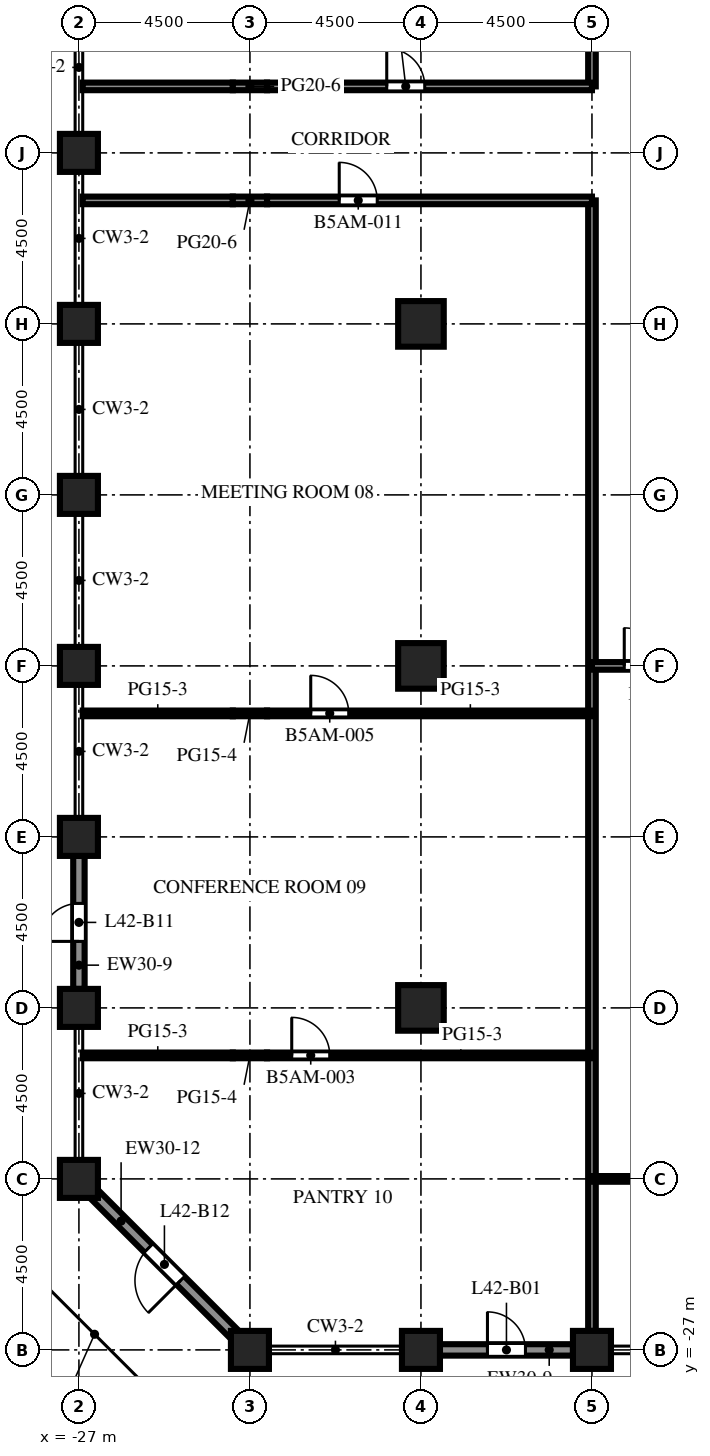
"""IFC4 building model, lengths in metres.
Left out: names, types, materials, properties, quantities, classifications, styles, units other than length and angle.
Written with IfcOpenShell. Run it as: python <this file> out.ifc"""

import sys

from ifc_helpers import new_model, si_unit, direction, frame, frame_2d, origin, origin_2d, place, context, subcontext, project, spatial, rectangle, extrude, element, fill, save


model = new_model("IFC4")
c1 = context("Model", 3, precision=1e-05, world=origin(), true_north=direction((0.0, 1.0)))
c2 = subcontext(c1, "Body", "Model", "MODEL_VIEW")
j1 = project(units=[si_unit("LENGTHUNIT", "METRE"), si_unit("PLANEANGLEUNIT", "RADIAN")], contexts=[c1])
p1 = place(None, origin())
s1 = spatial("IfcSite", under=j1, at=p1, CompositionType="ELEMENT")
p2 = place(p1, origin())
s2 = spatial("IfcBuilding", under=s1, at=p2, CompositionType="ELEMENT")
p3 = place(p2, frame((0.0, 0.0, 185.5)))
s3 = spatial("IfcBuildingStorey", under=s2, at=p3, CompositionType="ELEMENT", Elevation=185.5)
p4 = place(p3, frame((-27.0, -22.5, 0.0), z_axis=(0.0, 0.0, 1.0), x_axis=(1.0, 0.0, 0.0)))
e1 = element("IfcColumn", 1, at=p4, inside=s3, PredefinedType="COLUMN", context=c2, shape_type="SweptSolid", body=[
    extrude(rectangle(XDim=1.0, YDim=1.0, at=origin_2d()), origin(), (0.0, 0.0, 1.0), 6.0),
])
p5 = place(p3, frame((-27.0, -18.0, 0.0), z_axis=(0.0, 0.0, 1.0), x_axis=(1.0, 0.0, 0.0)))
e2 = element("IfcColumn", 2, at=p5, inside=s3, PredefinedType="COLUMN", context=c2, shape_type="SweptSolid", body=[
    extrude(rectangle(XDim=1.0, YDim=1.0, at=origin_2d()), origin(), (0.0, 0.0, 1.0), 3.75),
])
p6 = place(p3, frame((-27.0, -13.5, 0.0), z_axis=(0.0, 0.0, 1.0), x_axis=(1.0, 0.0, 0.0)))
e3 = element("IfcColumn", 3, at=p6, inside=s3, PredefinedType="COLUMN", context=c2, shape_type="SweptSolid", body=[
    extrude(rectangle(XDim=1.0, YDim=1.0, at=origin_2d()), origin(), (0.0, 0.0, 1.0), 6.0),
])
p7 = place(p3, frame((-27.0, -9.0, 0.0), z_axis=(0.0, 0.0, 1.0), x_axis=(1.0, 0.0, 0.0)))
e4 = element("IfcColumn", 4, at=p7, inside=s3, PredefinedType="COLUMN", context=c2, shape_type="SweptSolid", body=[
    extrude(rectangle(XDim=1.0, YDim=1.0, at=origin_2d()), origin(), (0.0, 0.0, 1.0), 3.75),
])
p8 = place(p3, frame((-27.0, -4.5, 0.0), z_axis=(0.0, 0.0, 1.0), x_axis=(1.0, 0.0, 0.0)))
e5 = element("IfcColumn", 5, at=p8, inside=s3, PredefinedType="COLUMN", context=c2, shape_type="SweptSolid", body=[
    extrude(rectangle(XDim=1.0, YDim=1.0, at=origin_2d()), origin(), (0.0, 0.0, 1.0), 6.0),
])
p9 = place(p3, frame((-27.0, 0.0, 0.0), z_axis=(0.0, 0.0, 1.0), x_axis=(1.0, 0.0, 0.0)))
e6 = element("IfcColumn", 6, at=p9, inside=s3, PredefinedType="COLUMN", context=c2, shape_type="SweptSolid", body=[
    extrude(rectangle(XDim=1.0, YDim=1.0, at=origin_2d()), origin(), (0.0, 0.0, 1.0), 3.75),
])
p10 = place(p3, frame((-27.0, 4.5, 0.0), z_axis=(0.0, 0.0, 1.0), x_axis=(1.0, 0.0, 0.0)))
e7 = element("IfcColumn", 7, at=p10, inside=s3, PredefinedType="COLUMN", context=c2, shape_type="SweptSolid", body=[
    extrude(rectangle(XDim=1.0, YDim=1.0, at=origin_2d()), origin(), (0.0, 0.0, 1.0), 6.0),
])
p11 = place(p3, frame((-22.5, -27.0, 0.0), z_axis=(0.0, 0.0, 1.0), x_axis=(1.0, 0.0, 0.0)))
e8 = element("IfcColumn", 8, at=p11, inside=s3, PredefinedType="COLUMN", context=c2, shape_type="SweptSolid", body=[
    extrude(rectangle(XDim=1.0, YDim=1.0, at=origin_2d()), origin(), (0.0, 0.0, 1.0), 3.75),
])
for number, where, z_axis, x_axis in (
    (9, (-18.0, -27.0, 0.0), (0.0, 0.0, 1.0), (1.0, 0.0, 0.0)),
    (10, (-13.5, -27.0, 0.0), (0.0, 0.0, 1.0), (1.0, 0.0, 0.0)),
):
    element("IfcColumn", number, at=place(p3, frame(where, z_axis=z_axis, x_axis=x_axis)), inside=s3, PredefinedType="COLUMN", context=c2, shape_type="SweptSolid", body=[
        extrude(rectangle(XDim=1.0, YDim=1.0, at=origin_2d()), origin(), (0.0, 0.0, 1.0), 6.0),
    ])
for number, where, z_axis, x_axis in (
    (11, (-18.0, -18.0, 0.0), (0.0, 0.0, 1.0), (1.0, 0.0, 0.0)),
    (12, (-18.0, -9.0, 0.0), (0.0, 0.0, 1.0), (1.0, 0.0, 0.0)),
    (13, (-18.0, 0.0, 0.0), (0.0, 0.0, 1.0), (1.0, 0.0, 0.0)),
):
    element("IfcColumn", number, at=place(p3, frame(where, z_axis=z_axis, x_axis=x_axis)), inside=s3, PredefinedType="COLUMN", context=c2, shape_type="SweptSolid", body=[
        extrude(rectangle(XDim=1.2, YDim=1.2, at=origin_2d()), origin(), (0.0, 0.0, 1.0), 5.55),
    ])
p12 = place(p3, frame((-14.0, -27.0, 0.0), z_axis=(0.0, 0.0, 1.0), x_axis=(-1.0, 0.0, 0.0)))
e14 = element("IfcWall", 14, at=p12, inside=s3, PredefinedType="SOLIDWALL", context=c2, shape_type="SweptSolid", body=[
    extrude(rectangle(XDim=3.5, YDim=0.3, at=frame_2d((1.75, 0.0))), origin(), (0.0, 0.0, 1.0), 4.75),
])
p13 = place(p12, frame((1.25, 0.0, 0.0)))
e15 = element("IfcOpeningElement", 15, at=p13, cuts=e14, PredefinedType="OPENING", context=c2, shape_type="SweptSolid", body=[
    extrude(rectangle(XDim=1.0, YDim=2.2, at=frame_2d((0.5, 1.1))), frame((0.0, 0.16, 0.0), z_axis=(0.0, -1.0, 0.0), x_axis=(1.0, 0.0, 0.0)), (0.0, 0.0, 1.0), 0.32),
])
p14 = place(p3, frame((-27.0, -17.5, 0.0), z_axis=(0.0, 0.0, 1.0), x_axis=(0.0, 1.0, 0.0)))
e16 = element("IfcWall", 16, at=p14, inside=s3, PredefinedType="SOLIDWALL", context=c2, shape_type="SweptSolid", body=[
    extrude(rectangle(XDim=3.5, YDim=0.3, at=frame_2d((1.75, 0.0))), origin(), (0.0, 0.0, 1.0), 4.75),
])
p15 = place(p14, frame((1.25, 0.0, 0.0)))
e17 = element("IfcOpeningElement", 17, at=p15, cuts=e16, PredefinedType="OPENING", context=c2, shape_type="SweptSolid", body=[
    extrude(rectangle(XDim=1.0, YDim=2.2, at=frame_2d((0.5, 1.1))), frame((0.0, 0.16, 0.0), z_axis=(0.0, -1.0, 0.0), x_axis=(1.0, 0.0, 0.0)), (0.0, 0.0, 1.0), 0.32),
])
p16 = place(p3, frame((-22.894, -26.606, 0.0), z_axis=(0.0, 0.0, 1.0), x_axis=(-0.707106781187, 0.707106781187, 0.0)))
e18 = element("IfcWall", 18, at=p16, inside=s3, PredefinedType="SOLIDWALL", context=c2, shape_type="SweptSolid", body=[
    extrude(rectangle(XDim=5.25, YDim=0.3, at=frame_2d((2.625, 0.0))), origin(), (0.0, 0.0, 1.0), 3.75),
])
p17 = place(p16, frame((2.025, 0.0, 0.0)))
e19 = element("IfcOpeningElement", 19, at=p17, cuts=e18, PredefinedType="OPENING", context=c2, shape_type="SweptSolid", body=[
    extrude(rectangle(XDim=1.2, YDim=2.2, at=frame_2d((0.6, 1.1))), frame((0.0, 0.16, 0.0), z_axis=(0.0, -1.0, 0.0), x_axis=(1.0, 0.0, 0.0)), (0.0, 0.0, 1.0), 0.32),
])
p18 = place(p3, frame((-13.5, -26.5, 0.0), z_axis=(0.0, 0.0, 1.0), x_axis=(0.0, 1.0, 0.0)))
e20 = element("IfcWall", 20, at=p18, inside=s3, PredefinedType="PARTITIONING", context=c2, shape_type="SweptSolid", body=[
    extrude(rectangle(XDim=29.75, YDim=0.2, at=frame_2d((14.875, 0.0))), origin(), (0.0, 0.0, 1.0), 5.55),
])
p19 = place(p3, frame((-13.5, 6.25, 0.0), z_axis=(0.0, 0.0, 1.0), x_axis=(0.0, 1.0, 0.0)))
e21 = element("IfcWall", 21, at=p19, inside=s3, PredefinedType="PARTITIONING", context=c2, shape_type="SweptSolid", body=[
    extrude(rectangle(XDim=20.25, YDim=0.2, at=frame_2d((10.125, 0.0))), origin(), (0.0, 0.0, 1.0), 5.55),
])
p20 = place(p3, frame((21.0, -22.5, 0.0), z_axis=(0.0, 0.0, 1.0), x_axis=(-1.0, 0.0, 0.0)))
e22 = element("IfcWall", 22, at=p20, inside=s3, PredefinedType="PARTITIONING", context=c2, shape_type="SweptSolid", body=[
    extrude(rectangle(XDim=34.5, YDim=0.15, at=frame_2d((17.25, 0.0))), origin(), (0.0, 0.0, 1.0), 5.55),
])
p21 = place(p20, frame((17.15, 0.0, 0.0)))
e23 = element("IfcOpeningElement", 23, at=p21, cuts=e22, PredefinedType="OPENING", context=c2, shape_type="SweptSolid", body=[
    extrude(rectangle(XDim=1.0, YDim=2.1, at=frame_2d((0.5, 1.05))), frame((0.0, 0.085, 0.0), z_axis=(0.0, -1.0, 0.0), x_axis=(1.0, 0.0, 0.0)), (0.0, 0.0, 1.0), 0.17),
])
p22 = place(p20, frame((3.4, 0.0, 0.0)))
e24 = element("IfcOpeningElement", 24, at=p22, cuts=e22, PredefinedType="OPENING", context=c2, shape_type="SweptSolid", body=[
    extrude(rectangle(XDim=1.0, YDim=2.1, at=frame_2d((0.5, 1.05))), frame((0.0, 0.085, 0.0), z_axis=(0.0, -1.0, 0.0), x_axis=(1.0, 0.0, 0.0)), (0.0, 0.0, 1.0), 0.17),
])
p23 = place(p3, frame((-26.9, -19.25, 0.0), z_axis=(0.0, 0.0, 1.0), x_axis=(1.0, 0.0, 0.0)))
e25 = element("IfcWall", 25, at=p23, inside=s3, PredefinedType="PARTITIONING", context=c2, shape_type="SweptSolid", body=[
    extrude(rectangle(XDim=3.95, YDim=0.15, at=frame_2d((1.975, 0.0))), origin(), (0.0, 0.0, 1.0), 5.55),
])
p24 = place(p3, frame((-22.95, -19.25, 0.0), z_axis=(0.0, 0.0, 1.0), x_axis=(1.0, 0.0, 0.0)))
e26 = element("IfcWall", 26, at=p24, inside=s3, PredefinedType="PARTITIONING", context=c2, shape_type="SweptSolid", body=[
    extrude(rectangle(XDim=0.9, YDim=0.15, at=frame_2d((0.45, 0.0))), origin(), (0.0, 0.0, 1.0), 3.72),
])
p25 = place(p3, frame((-13.5, -19.25, 0.0), z_axis=(0.0, 0.0, 1.0), x_axis=(-1.0, 0.0, 0.0)))
e27 = element("IfcWall", 27, at=p25, inside=s3, PredefinedType="PARTITIONING", context=c2, shape_type="SweptSolid", body=[
    extrude(rectangle(XDim=8.55, YDim=0.15, at=frame_2d((4.275, 0.0))), origin(), (0.0, 0.0, 1.0), 5.55),
])
p26 = place(p25, frame((6.9, 0.0, 0.0)))
e28 = element("IfcOpeningElement", 28, at=p26, cuts=e27, PredefinedType="OPENING", context=c2, shape_type="SweptSolid", body=[
    extrude(rectangle(XDim=1.0, YDim=2.1, at=frame_2d((0.5, 1.05))), frame((0.0, 0.085, 0.0), z_axis=(0.0, -1.0, 0.0), x_axis=(1.0, 0.0, 0.0)), (0.0, 0.0, 1.0), 0.17),
])
p27 = place(p3, frame((-26.9, -10.25, 0.0), z_axis=(0.0, 0.0, 1.0), x_axis=(1.0, 0.0, 0.0)))
e29 = element("IfcWall", 29, at=p27, inside=s3, PredefinedType="PARTITIONING", context=c2, shape_type="SweptSolid", body=[
    extrude(rectangle(XDim=3.95, YDim=0.15, at=frame_2d((1.975, 0.0))), origin(), (0.0, 0.0, 1.0), 5.55),
])
p28 = place(p3, frame((-22.95, -10.25, 0.0), z_axis=(0.0, 0.0, 1.0), x_axis=(1.0, 0.0, 0.0)))
e30 = element("IfcWall", 30, at=p28, inside=s3, PredefinedType="PARTITIONING", context=c2, shape_type="SweptSolid", body=[
    extrude(rectangle(XDim=0.9, YDim=0.15, at=frame_2d((0.45, 0.0))), origin(), (0.0, 0.0, 1.0), 3.72),
])
p29 = place(p3, frame((-13.5, -10.25, 0.0), z_axis=(0.0, 0.0, 1.0), x_axis=(-1.0, 0.0, 0.0)))
e31 = element("IfcWall", 31, at=p29, inside=s3, PredefinedType="PARTITIONING", context=c2, shape_type="SweptSolid", body=[
    extrude(rectangle(XDim=8.55, YDim=0.15, at=frame_2d((4.275, 0.0))), origin(), (0.0, 0.0, 1.0), 5.55),
])
p30 = place(p29, frame((6.4, 0.0, 0.0)))
e32 = element("IfcOpeningElement", 32, at=p30, cuts=e31, PredefinedType="OPENING", context=c2, shape_type="SweptSolid", body=[
    extrude(rectangle(XDim=1.0, YDim=2.1, at=frame_2d((0.5, 1.05))), frame((0.0, 0.085, 0.0), z_axis=(0.0, -1.0, 0.0), x_axis=(1.0, 0.0, 0.0)), (0.0, 0.0, 1.0), 0.17),
])
p31 = place(p3, frame((-10.5, -9.0, 0.0), z_axis=(0.0, 0.0, 1.0), x_axis=(-1.0, 0.0, 0.0)))
e33 = element("IfcWall", 33, at=p31, inside=s3, PredefinedType="PARTITIONING", context=c2, shape_type="SweptSolid", body=[
    extrude(rectangle(XDim=3.0, YDim=0.2, at=frame_2d((1.5, 0.0))), origin(), (0.0, 0.0, 1.0), 5.55),
])
p32 = place(p31, frame((1.15, 0.0, 0.0)))
e34 = element("IfcOpeningElement", 34, at=p32, cuts=e33, PredefinedType="OPENING", context=c2, shape_type="SweptSolid", body=[
    extrude(rectangle(XDim=1.0, YDim=2.1, at=frame_2d((0.5, 1.05))), frame((0.0, 0.11, 0.0), z_axis=(0.0, -1.0, 0.0), x_axis=(1.0, 0.0, 0.0)), (0.0, 0.0, 1.0), 0.22),
])
p33 = place(p3, frame((-26.9, 3.25, 0.0), z_axis=(0.0, 0.0, 1.0), x_axis=(1.0, 0.0, 0.0)))
e35 = element("IfcWall", 35, at=p33, inside=s3, PredefinedType="PARTITIONING", context=c2, shape_type="SweptSolid", body=[
    extrude(rectangle(XDim=3.95, YDim=0.2, at=frame_2d((1.975, 0.0))), origin(), (0.0, 0.0, 1.0), 5.55),
])
p34 = place(p3, frame((-22.95, 3.25, 0.0), z_axis=(0.0, 0.0, 1.0), x_axis=(1.0, 0.0, 0.0)))
e36 = element("IfcWall", 36, at=p34, inside=s3, PredefinedType="PARTITIONING", context=c2, shape_type="SweptSolid", body=[
    extrude(rectangle(XDim=0.9, YDim=0.2, at=frame_2d((0.45, 0.0))), origin(), (0.0, 0.0, 1.0), 3.72),
])
p35 = place(p3, frame((-13.5, 3.25, 0.0), z_axis=(0.0, 0.0, 1.0), x_axis=(-1.0, 0.0, 0.0)))
e37 = element("IfcWall", 37, at=p35, inside=s3, PredefinedType="PARTITIONING", context=c2, shape_type="SweptSolid", body=[
    extrude(rectangle(XDim=8.55, YDim=0.2, at=frame_2d((4.275, 0.0))), origin(), (0.0, 0.0, 1.0), 5.55),
])
p36 = place(p35, frame((5.65, 0.0, 0.0)))
e38 = element("IfcOpeningElement", 38, at=p36, cuts=e37, PredefinedType="OPENING", context=c2, shape_type="SweptSolid", body=[
    extrude(rectangle(XDim=1.0, YDim=2.1, at=frame_2d((0.5, 1.05))), frame((0.0, 0.11, 0.0), z_axis=(0.0, -1.0, 0.0), x_axis=(1.0, 0.0, 0.0)), (0.0, 0.0, 1.0), 0.22),
])
p37 = place(p3, frame((-26.9, 6.25, 0.0), z_axis=(0.0, 0.0, 1.0), x_axis=(1.0, 0.0, 0.0)))
e39 = element("IfcWall", 39, at=p37, inside=s3, PredefinedType="PARTITIONING", context=c2, shape_type="SweptSolid", body=[
    extrude(rectangle(XDim=3.95, YDim=0.2, at=frame_2d((1.975, 0.0))), origin(), (0.0, 0.0, 1.0), 5.55),
])
p38 = place(p3, frame((-22.95, 6.25, 0.0), z_axis=(0.0, 0.0, 1.0), x_axis=(1.0, 0.0, 0.0)))
e40 = element("IfcWall", 40, at=p38, inside=s3, PredefinedType="PARTITIONING", context=c2, shape_type="SweptSolid", body=[
    extrude(rectangle(XDim=0.9, YDim=0.2, at=frame_2d((0.45, 0.0))), origin(), (0.0, 0.0, 1.0), 3.72),
])
p39 = place(p3, frame((-22.05, 6.25, 0.0), z_axis=(0.0, 0.0, 1.0), x_axis=(1.0, 0.0, 0.0)))
e41 = element("IfcWall", 41, at=p39, inside=s3, PredefinedType="PARTITIONING", context=c2, shape_type="SweptSolid", body=[
    extrude(rectangle(XDim=8.55, YDim=0.2, at=frame_2d((4.275, 0.0))), origin(), (0.0, 0.0, 1.0), 5.55),
])
p40 = place(p39, frame((3.15, 0.0, 0.0)))
e42 = element("IfcOpeningElement", 42, at=p40, cuts=e41, PredefinedType="OPENING", context=c2, shape_type="SweptSolid", body=[
    extrude(rectangle(XDim=1.0, YDim=2.1, at=frame_2d((0.5, 1.05))), frame((0.0, 0.11, 0.0), z_axis=(0.0, -1.0, 0.0), x_axis=(1.0, 0.0, 0.0)), (0.0, 0.0, 1.0), 0.22),
])
p41 = place(p13, origin())
e43 = element("IfcDoor", 43, at=p41, inside=s3, OperationType="SINGLE_SWING_RIGHT", PredefinedType="DOOR", context=c2, shape_type="SweptSolid", body=[
    extrude(rectangle(XDim=1.0, YDim=2.2, at=frame_2d((0.5, 1.1))), frame((0.0, 0.025, 0.0), z_axis=(0.0, -1.0, 0.0), x_axis=(1.0, 0.0, 0.0)), (0.0, 0.0, 1.0), 0.05),
])
fill(e15, e43)
p42 = place(p15, origin())
e44 = element("IfcDoor", 44, at=p42, inside=s3, OperationType="SINGLE_SWING_LEFT", PredefinedType="DOOR", context=c2, shape_type="SweptSolid", body=[
    extrude(rectangle(XDim=1.0, YDim=2.2, at=frame_2d((0.5, 1.1))), frame((0.0, 0.025, 0.0), z_axis=(0.0, -1.0, 0.0), x_axis=(1.0, 0.0, 0.0)), (0.0, 0.0, 1.0), 0.05),
])
fill(e17, e44)
p43 = place(p17, origin())
e45 = element("IfcDoor", 45, at=p43, inside=s3, OperationType="SINGLE_SWING_LEFT", PredefinedType="DOOR", context=c2, shape_type="SweptSolid", body=[
    extrude(rectangle(XDim=1.2, YDim=2.2, at=frame_2d((0.6, 1.1))), frame((0.0, 0.025, 0.0), z_axis=(0.0, -1.0, 0.0), x_axis=(1.0, 0.0, 0.0)), (0.0, 0.0, 1.0), 0.05),
])
fill(e19, e45)
p44 = place(p26, origin())
e46 = element("IfcDoor", 46, at=p44, inside=s3, OperationType="SINGLE_SWING_RIGHT", PredefinedType="DOOR", context=c2, shape_type="SweptSolid", body=[
    extrude(rectangle(XDim=1.0, YDim=2.1, at=frame_2d((0.5, 1.05))), frame((0.0, 0.025, 0.0), z_axis=(0.0, -1.0, 0.0), x_axis=(1.0, 0.0, 0.0)), (0.0, 0.0, 1.0), 0.05),
])
fill(e28, e46)
p45 = place(p30, origin())
e47 = element("IfcDoor", 47, at=p45, inside=s3, OperationType="SINGLE_SWING_RIGHT", PredefinedType="DOOR", context=c2, shape_type="SweptSolid", body=[
    extrude(rectangle(XDim=1.0, YDim=2.1, at=frame_2d((0.5, 1.05))), frame((0.0, 0.025, 0.0), z_axis=(0.0, -1.0, 0.0), x_axis=(1.0, 0.0, 0.0)), (0.0, 0.0, 1.0), 0.05),
])
fill(e32, e47)
p46 = place(p32, origin())
e48 = element("IfcDoor", 48, at=p46, inside=s3, OperationType="SINGLE_SWING_RIGHT", PredefinedType="DOOR", context=c2, shape_type="SweptSolid", body=[
    extrude(rectangle(XDim=1.0, YDim=2.1, at=frame_2d((0.5, 1.05))), frame((0.0, 0.025, 0.0), z_axis=(0.0, -1.0, 0.0), x_axis=(1.0, 0.0, 0.0)), (0.0, 0.0, 1.0), 0.05),
])
fill(e34, e48)
p47 = place(p36, origin())
e49 = element("IfcDoor", 49, at=p47, inside=s3, OperationType="SINGLE_SWING_RIGHT", PredefinedType="DOOR", context=c2, shape_type="SweptSolid", body=[
    extrude(rectangle(XDim=1.0, YDim=2.1, at=frame_2d((0.5, 1.05))), frame((0.0, 0.025, 0.0), z_axis=(0.0, -1.0, 0.0), x_axis=(1.0, 0.0, 0.0)), (0.0, 0.0, 1.0), 0.05),
])
fill(e38, e49)
p48 = place(p40, origin())
e50 = element("IfcDoor", 50, at=p48, inside=s3, OperationType="SINGLE_SWING_LEFT", PredefinedType="DOOR", context=c2, shape_type="SweptSolid", body=[
    extrude(rectangle(XDim=1.0, YDim=2.1, at=frame_2d((0.5, 1.05))), frame((0.0, 0.025, 0.0), z_axis=(0.0, -1.0, 0.0), x_axis=(1.0, 0.0, 0.0)), (0.0, 0.0, 1.0), 0.05),
])
fill(e42, e50)
save(model, sys.argv[1])
